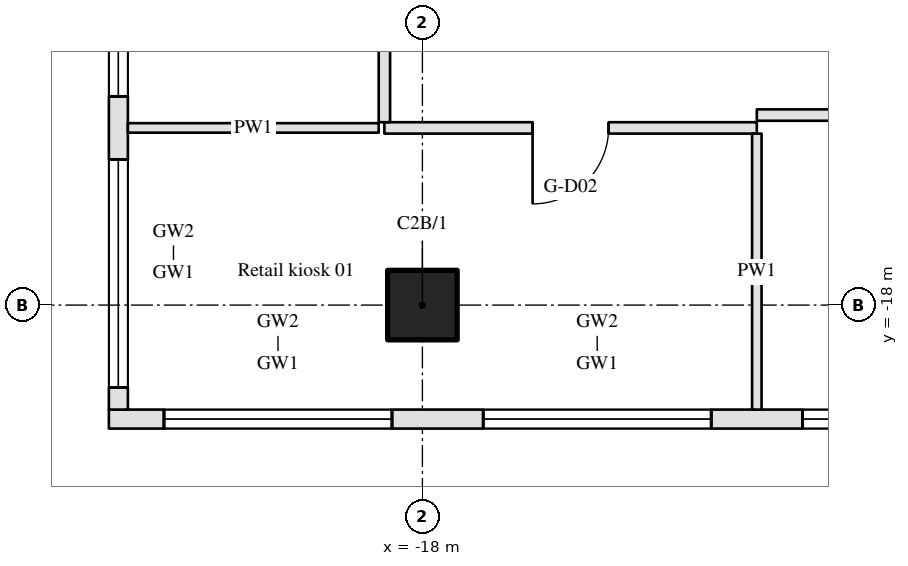
"""IFC4 building model, lengths in metres.
Left out: names, types, materials, properties, quantities, classifications, styles, units other than length and angle.
Written with IfcOpenShell. Run it as: python <this file> out.ifc"""

import sys

from ifc_helpers import new_model, si_unit, direction, frame, frame_2d, origin, origin_2d, place, context, subcontext, project, spatial, rectangle, hollow_circle, extrude, element, fill, save


model = new_model("IFC4")
c1 = context("Model", 3, precision=1e-05, world=origin(), true_north=direction((0.0, 1.0)))
c2 = subcontext(c1, "Body", "Model", "MODEL_VIEW")
j1 = project(units=[si_unit("LENGTHUNIT", "METRE"), si_unit("PLANEANGLEUNIT", "RADIAN")], contexts=[c1])
p1 = place(None, origin())
s1 = spatial("IfcSite", under=j1, at=p1, CompositionType="ELEMENT")
p2 = place(p1, origin())
s2 = spatial("IfcBuilding", under=s1, at=p2, CompositionType="ELEMENT")
p3 = place(p2, origin())
s3 = spatial("IfcBuildingStorey", under=s2, at=p3, CompositionType="ELEMENT", Elevation=0.0)
p4 = place(p3, frame((-18.0, -18.0, 0.0), z_axis=(0.0, 0.0, 1.0), x_axis=(1.0, 0.0, 0.0)))
e1 = element("IfcColumn", 1, at=p4, inside=s3, PredefinedType="COLUMN", context=c2, shape_type="SweptSolid", body=[
    extrude(hollow_circle(Radius=0.457, WallThickness=0.05, at=origin_2d()), origin(), (0.0, 0.0, 1.0), 10.8),
])
p5 = place(p3, frame((-22.125, -19.5, 0.0), z_axis=(0.0, 0.0, 1.0), x_axis=(1.0, 0.0, 0.0)))
e2 = element("IfcWall", 2, at=p5, inside=s3, PredefinedType="STANDARD", context=c2, shape_type="SweptSolid", body=[
    extrude(rectangle(XDim=42.25, YDim=0.25, at=frame_2d((21.125, 0.0))), origin(), (0.0, 0.0, 1.0), 10.0),
])
p6 = place(p5, frame((0.725, 0.0, 0.15)))
e3 = element("IfcOpeningElement", 3, at=p6, cuts=e2, PredefinedType="OPENING", context=c2, shape_type="SweptSolid", body=[
    extrude(rectangle(XDim=3.0, YDim=4.2, at=frame_2d((1.5, 2.1))), frame((0.0, 0.135, 0.0), z_axis=(0.0, -1.0, 0.0), x_axis=(1.0, 0.0, 0.0)), (0.0, 0.0, 1.0), 0.27),
])
p7 = place(p5, frame((0.725, 0.0, 4.95)))
e4 = element("IfcOpeningElement", 4, at=p7, cuts=e2, PredefinedType="OPENING", context=c2, shape_type="SweptSolid", body=[
    extrude(rectangle(XDim=3.0, YDim=4.4, at=frame_2d((1.5, 2.2))), frame((0.0, 0.135, 0.0), z_axis=(0.0, -1.0, 0.0), x_axis=(1.0, 0.0, 0.0)), (0.0, 0.0, 1.0), 0.27),
])
p8 = place(p5, frame((4.925, 0.0, 0.15)))
e5 = element("IfcOpeningElement", 5, at=p8, cuts=e2, PredefinedType="OPENING", context=c2, shape_type="SweptSolid", body=[
    extrude(rectangle(XDim=3.0, YDim=4.2, at=frame_2d((1.5, 2.1))), frame((0.0, 0.135, 0.0), z_axis=(0.0, -1.0, 0.0), x_axis=(1.0, 0.0, 0.0)), (0.0, 0.0, 1.0), 0.27),
])
p9 = place(p5, frame((4.925, 0.0, 4.95)))
e6 = element("IfcOpeningElement", 6, at=p9, cuts=e2, PredefinedType="OPENING", context=c2, shape_type="SweptSolid", body=[
    extrude(rectangle(XDim=3.0, YDim=4.4, at=frame_2d((1.5, 2.2))), frame((0.0, 0.135, 0.0), z_axis=(0.0, -1.0, 0.0), x_axis=(1.0, 0.0, 0.0)), (0.0, 0.0, 1.0), 0.27),
])
p10 = place(p5, frame((9.125, 0.0, 0.15)))
e7 = element("IfcOpeningElement", 7, at=p10, cuts=e2, PredefinedType="OPENING", context=c2, shape_type="SweptSolid", body=[
    extrude(rectangle(XDim=3.0, YDim=4.2, at=frame_2d((1.5, 2.1))), frame((0.0, 0.135, 0.0), z_axis=(0.0, -1.0, 0.0), x_axis=(1.0, 0.0, 0.0)), (0.0, 0.0, 1.0), 0.27),
])
p11 = place(p5, frame((9.125, 0.0, 4.95)))
e8 = element("IfcOpeningElement", 8, at=p11, cuts=e2, PredefinedType="OPENING", context=c2, shape_type="SweptSolid", body=[
    extrude(rectangle(XDim=3.0, YDim=4.4, at=frame_2d((1.5, 2.2))), frame((0.0, 0.135, 0.0), z_axis=(0.0, -1.0, 0.0), x_axis=(1.0, 0.0, 0.0)), (0.0, 0.0, 1.0), 0.27),
])
p12 = place(p5, frame((13.325, 0.0, 0.15)))
e9 = element("IfcOpeningElement", 9, at=p12, cuts=e2, PredefinedType="OPENING", context=c2, shape_type="SweptSolid", body=[
    extrude(rectangle(XDim=3.0, YDim=4.2, at=frame_2d((1.5, 2.1))), frame((0.0, 0.135, 0.0), z_axis=(0.0, -1.0, 0.0), x_axis=(1.0, 0.0, 0.0)), (0.0, 0.0, 1.0), 0.27),
])
p13 = place(p5, frame((13.325, 0.0, 4.95)))
e10 = element("IfcOpeningElement", 10, at=p13, cuts=e2, PredefinedType="OPENING", context=c2, shape_type="SweptSolid", body=[
    extrude(rectangle(XDim=3.0, YDim=4.4, at=frame_2d((1.5, 2.2))), frame((0.0, 0.135, 0.0), z_axis=(0.0, -1.0, 0.0), x_axis=(1.0, 0.0, 0.0)), (0.0, 0.0, 1.0), 0.27),
])
p14 = place(p5, frame((17.825, 0.0, 0.0)))
e11 = element("IfcOpeningElement", 11, at=p14, cuts=e2, PredefinedType="OPENING", context=c2, shape_type="SweptSolid", body=[
    extrude(rectangle(XDim=2.4, YDim=2.6, at=frame_2d((1.2, 1.3))), frame((0.0, 0.135, 0.0), z_axis=(0.0, -1.0, 0.0), x_axis=(1.0, 0.0, 0.0)), (0.0, 0.0, 1.0), 0.27),
])
p15 = place(p5, frame((17.525, 0.0, 2.9)))
e12 = element("IfcOpeningElement", 12, at=p15, cuts=e2, PredefinedType="OPENING", context=c2, shape_type="SweptSolid", body=[
    extrude(rectangle(XDim=3.0, YDim=1.45, at=frame_2d((1.5, 0.725))), frame((0.0, 0.135, 0.0), z_axis=(0.0, -1.0, 0.0), x_axis=(1.0, 0.0, 0.0)), (0.0, 0.0, 1.0), 0.27),
])
p16 = place(p5, frame((17.525, 0.0, 4.95)))
e13 = element("IfcOpeningElement", 13, at=p16, cuts=e2, PredefinedType="OPENING", context=c2, shape_type="SweptSolid", body=[
    extrude(rectangle(XDim=3.0, YDim=4.4, at=frame_2d((1.5, 2.2))), frame((0.0, 0.135, 0.0), z_axis=(0.0, -1.0, 0.0), x_axis=(1.0, 0.0, 0.0)), (0.0, 0.0, 1.0), 0.27),
])
p17 = place(p5, frame((21.725, 0.0, 0.15)))
e14 = element("IfcOpeningElement", 14, at=p17, cuts=e2, PredefinedType="OPENING", context=c2, shape_type="SweptSolid", body=[
    extrude(rectangle(XDim=3.0, YDim=4.2, at=frame_2d((1.5, 2.1))), frame((0.0, 0.135, 0.0), z_axis=(0.0, -1.0, 0.0), x_axis=(1.0, 0.0, 0.0)), (0.0, 0.0, 1.0), 0.27),
])
p18 = place(p5, frame((21.725, 0.0, 4.95)))
e15 = element("IfcOpeningElement", 15, at=p18, cuts=e2, PredefinedType="OPENING", context=c2, shape_type="SweptSolid", body=[
    extrude(rectangle(XDim=3.0, YDim=4.4, at=frame_2d((1.5, 2.2))), frame((0.0, 0.135, 0.0), z_axis=(0.0, -1.0, 0.0), x_axis=(1.0, 0.0, 0.0)), (0.0, 0.0, 1.0), 0.27),
])
p19 = place(p5, frame((26.225, 0.0, 0.0)))
e16 = element("IfcOpeningElement", 16, at=p19, cuts=e2, PredefinedType="OPENING", context=c2, shape_type="SweptSolid", body=[
    extrude(rectangle(XDim=2.4, YDim=2.6, at=frame_2d((1.2, 1.3))), frame((0.0, 0.135, 0.0), z_axis=(0.0, -1.0, 0.0), x_axis=(1.0, 0.0, 0.0)), (0.0, 0.0, 1.0), 0.27),
])
p20 = place(p5, frame((25.925, 0.0, 2.9)))
e17 = element("IfcOpeningElement", 17, at=p20, cuts=e2, PredefinedType="OPENING", context=c2, shape_type="SweptSolid", body=[
    extrude(rectangle(XDim=3.0, YDim=1.45, at=frame_2d((1.5, 0.725))), frame((0.0, 0.135, 0.0), z_axis=(0.0, -1.0, 0.0), x_axis=(1.0, 0.0, 0.0)), (0.0, 0.0, 1.0), 0.27),
])
p21 = place(p5, frame((25.925, 0.0, 4.95)))
e18 = element("IfcOpeningElement", 18, at=p21, cuts=e2, PredefinedType="OPENING", context=c2, shape_type="SweptSolid", body=[
    extrude(rectangle(XDim=3.0, YDim=4.4, at=frame_2d((1.5, 2.2))), frame((0.0, 0.135, 0.0), z_axis=(0.0, -1.0, 0.0), x_axis=(1.0, 0.0, 0.0)), (0.0, 0.0, 1.0), 0.27),
])
p22 = place(p5, frame((30.125, 0.0, 0.15)))
e19 = element("IfcOpeningElement", 19, at=p22, cuts=e2, PredefinedType="OPENING", context=c2, shape_type="SweptSolid", body=[
    extrude(rectangle(XDim=3.0, YDim=4.2, at=frame_2d((1.5, 2.1))), frame((0.0, 0.135, 0.0), z_axis=(0.0, -1.0, 0.0), x_axis=(1.0, 0.0, 0.0)), (0.0, 0.0, 1.0), 0.27),
])
p23 = place(p5, frame((30.125, 0.0, 4.95)))
e20 = element("IfcOpeningElement", 20, at=p23, cuts=e2, PredefinedType="OPENING", context=c2, shape_type="SweptSolid", body=[
    extrude(rectangle(XDim=3.0, YDim=4.4, at=frame_2d((1.5, 2.2))), frame((0.0, 0.135, 0.0), z_axis=(0.0, -1.0, 0.0), x_axis=(1.0, 0.0, 0.0)), (0.0, 0.0, 1.0), 0.27),
])
p24 = place(p5, frame((34.325, 0.0, 0.15)))
e21 = element("IfcOpeningElement", 21, at=p24, cuts=e2, PredefinedType="OPENING", context=c2, shape_type="SweptSolid", body=[
    extrude(rectangle(XDim=3.0, YDim=4.2, at=frame_2d((1.5, 2.1))), frame((0.0, 0.135, 0.0), z_axis=(0.0, -1.0, 0.0), x_axis=(1.0, 0.0, 0.0)), (0.0, 0.0, 1.0), 0.27),
])
p25 = place(p5, frame((34.325, 0.0, 4.95)))
e22 = element("IfcOpeningElement", 22, at=p25, cuts=e2, PredefinedType="OPENING", context=c2, shape_type="SweptSolid", body=[
    extrude(rectangle(XDim=3.0, YDim=4.4, at=frame_2d((1.5, 2.2))), frame((0.0, 0.135, 0.0), z_axis=(0.0, -1.0, 0.0), x_axis=(1.0, 0.0, 0.0)), (0.0, 0.0, 1.0), 0.27),
])
p26 = place(p5, frame((38.525, 0.0, 0.15)))
e23 = element("IfcOpeningElement", 23, at=p26, cuts=e2, PredefinedType="OPENING", context=c2, shape_type="SweptSolid", body=[
    extrude(rectangle(XDim=3.0, YDim=4.2, at=frame_2d((1.5, 2.1))), frame((0.0, 0.135, 0.0), z_axis=(0.0, -1.0, 0.0), x_axis=(1.0, 0.0, 0.0)), (0.0, 0.0, 1.0), 0.27),
])
p27 = place(p5, frame((38.525, 0.0, 4.95)))
e24 = element("IfcOpeningElement", 24, at=p27, cuts=e2, PredefinedType="OPENING", context=c2, shape_type="SweptSolid", body=[
    extrude(rectangle(XDim=3.0, YDim=4.4, at=frame_2d((1.5, 2.2))), frame((0.0, 0.135, 0.0), z_axis=(0.0, -1.0, 0.0), x_axis=(1.0, 0.0, 0.0)), (0.0, 0.0, 1.0), 0.27),
])
p28 = place(p3, frame((-22.0, 11.025, 0.0), z_axis=(0.0, 0.0, 1.0), x_axis=(0.0, -1.0, 0.0)))
e25 = element("IfcWall", 25, at=p28, inside=s3, PredefinedType="STANDARD", context=c2, shape_type="SweptSolid", body=[
    extrude(rectangle(XDim=30.4, YDim=0.25, at=frame_2d((15.2, 0.0))), origin(), (0.0, 0.0, 1.0), 10.0),
])
p29 = place(p28, frame((0.291, 0.0, 0.15)))
e26 = element("IfcOpeningElement", 26, at=p29, cuts=e25, PredefinedType="OPENING", context=c2, shape_type="SweptSolid", body=[
    extrude(rectangle(XDim=3.0, YDim=4.2, at=frame_2d((1.5, 2.1))), frame((0.0, 0.135, 0.0), z_axis=(0.0, -1.0, 0.0), x_axis=(1.0, 0.0, 0.0)), (0.0, 0.0, 1.0), 0.27),
])
p30 = place(p28, frame((0.291, 0.0, 4.95)))
e27 = element("IfcOpeningElement", 27, at=p30, cuts=e25, PredefinedType="OPENING", context=c2, shape_type="SweptSolid", body=[
    extrude(rectangle(XDim=3.0, YDim=4.4, at=frame_2d((1.5, 2.2))), frame((0.0, 0.135, 0.0), z_axis=(0.0, -1.0, 0.0), x_axis=(1.0, 0.0, 0.0)), (0.0, 0.0, 1.0), 0.27),
])
p31 = place(p28, frame((4.122, 0.0, 0.15)))
e28 = element("IfcOpeningElement", 28, at=p31, cuts=e25, PredefinedType="OPENING", context=c2, shape_type="SweptSolid", body=[
    extrude(rectangle(XDim=3.0, YDim=4.2, at=frame_2d((1.5, 2.1))), frame((0.0, 0.135, 0.0), z_axis=(0.0, -1.0, 0.0), x_axis=(1.0, 0.0, 0.0)), (0.0, 0.0, 1.0), 0.27),
])
p32 = place(p28, frame((4.122, 0.0, 4.95)))
e29 = element("IfcOpeningElement", 29, at=p32, cuts=e25, PredefinedType="OPENING", context=c2, shape_type="SweptSolid", body=[
    extrude(rectangle(XDim=3.0, YDim=4.4, at=frame_2d((1.5, 2.2))), frame((0.0, 0.135, 0.0), z_axis=(0.0, -1.0, 0.0), x_axis=(1.0, 0.0, 0.0)), (0.0, 0.0, 1.0), 0.27),
])
p33 = place(p28, frame((7.953, 0.0, 0.15)))
e30 = element("IfcOpeningElement", 30, at=p33, cuts=e25, PredefinedType="OPENING", context=c2, shape_type="SweptSolid", body=[
    extrude(rectangle(XDim=3.0, YDim=4.2, at=frame_2d((1.5, 2.1))), frame((0.0, 0.135, 0.0), z_axis=(0.0, -1.0, 0.0), x_axis=(1.0, 0.0, 0.0)), (0.0, 0.0, 1.0), 0.27),
])
p34 = place(p28, frame((7.953, 0.0, 4.95)))
e31 = element("IfcOpeningElement", 31, at=p34, cuts=e25, PredefinedType="OPENING", context=c2, shape_type="SweptSolid", body=[
    extrude(rectangle(XDim=3.0, YDim=4.4, at=frame_2d((1.5, 2.2))), frame((0.0, 0.135, 0.0), z_axis=(0.0, -1.0, 0.0), x_axis=(1.0, 0.0, 0.0)), (0.0, 0.0, 1.0), 0.27),
])
p35 = place(p28, frame((11.784, 0.0, 0.15)))
e32 = element("IfcOpeningElement", 32, at=p35, cuts=e25, PredefinedType="OPENING", context=c2, shape_type="SweptSolid", body=[
    extrude(rectangle(XDim=3.0, YDim=4.2, at=frame_2d((1.5, 2.1))), frame((0.0, 0.135, 0.0), z_axis=(0.0, -1.0, 0.0), x_axis=(1.0, 0.0, 0.0)), (0.0, 0.0, 1.0), 0.27),
])
p36 = place(p28, frame((11.784, 0.0, 4.95)))
e33 = element("IfcOpeningElement", 33, at=p36, cuts=e25, PredefinedType="OPENING", context=c2, shape_type="SweptSolid", body=[
    extrude(rectangle(XDim=3.0, YDim=4.4, at=frame_2d((1.5, 2.2))), frame((0.0, 0.135, 0.0), z_axis=(0.0, -1.0, 0.0), x_axis=(1.0, 0.0, 0.0)), (0.0, 0.0, 1.0), 0.27),
])
p37 = place(p28, frame((15.916, 0.0, 0.0)))
e34 = element("IfcOpeningElement", 34, at=p37, cuts=e25, PredefinedType="OPENING", context=c2, shape_type="SweptSolid", body=[
    extrude(rectangle(XDim=2.4, YDim=2.6, at=frame_2d((1.2, 1.3))), frame((0.0, 0.135, 0.0), z_axis=(0.0, -1.0, 0.0), x_axis=(1.0, 0.0, 0.0)), (0.0, 0.0, 1.0), 0.27),
])
p38 = place(p28, frame((15.616, 0.0, 2.9)))
e35 = element("IfcOpeningElement", 35, at=p38, cuts=e25, PredefinedType="OPENING", context=c2, shape_type="SweptSolid", body=[
    extrude(rectangle(XDim=3.0, YDim=1.45, at=frame_2d((1.5, 0.725))), frame((0.0, 0.135, 0.0), z_axis=(0.0, -1.0, 0.0), x_axis=(1.0, 0.0, 0.0)), (0.0, 0.0, 1.0), 0.27),
])
p39 = place(p28, frame((15.616, 0.0, 4.95)))
e36 = element("IfcOpeningElement", 36, at=p39, cuts=e25, PredefinedType="OPENING", context=c2, shape_type="SweptSolid", body=[
    extrude(rectangle(XDim=3.0, YDim=4.4, at=frame_2d((1.5, 2.2))), frame((0.0, 0.135, 0.0), z_axis=(0.0, -1.0, 0.0), x_axis=(1.0, 0.0, 0.0)), (0.0, 0.0, 1.0), 0.27),
])
p40 = place(p28, frame((19.447, 0.0, 0.15)))
e37 = element("IfcOpeningElement", 37, at=p40, cuts=e25, PredefinedType="OPENING", context=c2, shape_type="SweptSolid", body=[
    extrude(rectangle(XDim=3.0, YDim=4.2, at=frame_2d((1.5, 2.1))), frame((0.0, 0.135, 0.0), z_axis=(0.0, -1.0, 0.0), x_axis=(1.0, 0.0, 0.0)), (0.0, 0.0, 1.0), 0.27),
])
p41 = place(p28, frame((19.447, 0.0, 4.95)))
e38 = element("IfcOpeningElement", 38, at=p41, cuts=e25, PredefinedType="OPENING", context=c2, shape_type="SweptSolid", body=[
    extrude(rectangle(XDim=3.0, YDim=4.4, at=frame_2d((1.5, 2.2))), frame((0.0, 0.135, 0.0), z_axis=(0.0, -1.0, 0.0), x_axis=(1.0, 0.0, 0.0)), (0.0, 0.0, 1.0), 0.27),
])
p42 = place(p28, frame((23.278, 0.0, 0.15)))
e39 = element("IfcOpeningElement", 39, at=p42, cuts=e25, PredefinedType="OPENING", context=c2, shape_type="SweptSolid", body=[
    extrude(rectangle(XDim=3.0, YDim=4.2, at=frame_2d((1.5, 2.1))), frame((0.0, 0.135, 0.0), z_axis=(0.0, -1.0, 0.0), x_axis=(1.0, 0.0, 0.0)), (0.0, 0.0, 1.0), 0.27),
])
p43 = place(p28, frame((23.278, 0.0, 4.95)))
e40 = element("IfcOpeningElement", 40, at=p43, cuts=e25, PredefinedType="OPENING", context=c2, shape_type="SweptSolid", body=[
    extrude(rectangle(XDim=3.0, YDim=4.4, at=frame_2d((1.5, 2.2))), frame((0.0, 0.135, 0.0), z_axis=(0.0, -1.0, 0.0), x_axis=(1.0, 0.0, 0.0)), (0.0, 0.0, 1.0), 0.27),
])
p44 = place(p28, frame((27.109, 0.0, 0.15)))
e41 = element("IfcOpeningElement", 41, at=p44, cuts=e25, PredefinedType="OPENING", context=c2, shape_type="SweptSolid", body=[
    extrude(rectangle(XDim=3.0, YDim=4.2, at=frame_2d((1.5, 2.1))), frame((0.0, 0.135, 0.0), z_axis=(0.0, -1.0, 0.0), x_axis=(1.0, 0.0, 0.0)), (0.0, 0.0, 1.0), 0.27),
])
p45 = place(p28, frame((27.109, 0.0, 4.95)))
e42 = element("IfcOpeningElement", 42, at=p45, cuts=e25, PredefinedType="OPENING", context=c2, shape_type="SweptSolid", body=[
    extrude(rectangle(XDim=3.0, YDim=4.4, at=frame_2d((1.5, 2.2))), frame((0.0, 0.135, 0.0), z_axis=(0.0, -1.0, 0.0), x_axis=(1.0, 0.0, 0.0)), (0.0, 0.0, 1.0), 0.27),
])
p46 = place(p3, frame((-21.875, -15.669, 0.0), z_axis=(0.0, 0.0, 1.0), x_axis=(1.0, 0.0, 0.0)))
e43 = element("IfcWall", 43, at=p46, inside=s3, PredefinedType="PARTITIONING", context=c2, shape_type="SweptSolid", body=[
    extrude(rectangle(XDim=3.3, YDim=0.125, at=frame_2d((1.65, 0.0))), origin(), (0.0, 0.0, 1.0), 9.86),
])
p47 = place(p3, frame((-13.6, -15.669, 0.0), z_axis=(0.0, 0.0, 1.0), x_axis=(-1.0, 0.0, 0.0)))
e44 = element("IfcWall", 44, at=p47, inside=s3, PredefinedType="PARTITIONING", context=c2, shape_type="SweptSolid", body=[
    extrude(rectangle(XDim=4.9, YDim=0.15, at=frame_2d((2.45, 0.0))), origin(), (0.0, 0.0, 1.0), 9.86),
])
p48 = place(p47, frame((1.95, 0.0, 0.0)))
e45 = element("IfcOpeningElement", 45, at=p48, cuts=e44, PredefinedType="OPENING", context=c2, shape_type="SweptSolid", body=[
    extrude(rectangle(XDim=1.0, YDim=2.1, at=frame_2d((0.5, 1.05))), frame((0.0, 0.085, 0.0), z_axis=(0.0, -1.0, 0.0), x_axis=(1.0, 0.0, 0.0)), (0.0, 0.0, 1.0), 0.17),
])
p49 = place(p3, frame((-5.2, -15.5, 0.0), z_axis=(0.0, 0.0, 1.0), x_axis=(-1.0, 0.0, 0.0)))
e46 = element("IfcWall", 46, at=p49, inside=s3, PredefinedType="PARTITIONING", context=c2, shape_type="SweptSolid", body=[
    extrude(rectangle(XDim=8.4, YDim=0.15, at=frame_2d((4.2, 0.0))), origin(), (0.0, 0.0, 1.0), 9.86),
])
p50 = place(p49, frame((3.7, 0.0, 0.0)))
e47 = element("IfcOpeningElement", 47, at=p50, cuts=e46, PredefinedType="OPENING", context=c2, shape_type="SweptSolid", body=[
    extrude(rectangle(XDim=1.0, YDim=2.1, at=frame_2d((0.5, 1.05))), frame((0.0, 0.085, 0.0), z_axis=(0.0, -1.0, 0.0), x_axis=(1.0, 0.0, 0.0)), (0.0, 0.0, 1.0), 0.17),
])
p51 = place(p3, frame((-18.5, -15.594, 0.0), z_axis=(0.0, 0.0, 1.0), x_axis=(0.0, 1.0, 0.0)))
e48 = element("IfcWall", 48, at=p51, inside=s3, PredefinedType="PARTITIONING", context=c2, shape_type="SweptSolid", body=[
    extrude(rectangle(XDim=6.094, YDim=0.15, at=frame_2d((3.047, 0.0))), origin(), (0.0, 0.0, 1.0), 9.86),
])
p52 = place(p51, frame((2.547, 0.0, 0.0)))
e49 = element("IfcOpeningElement", 49, at=p52, cuts=e48, PredefinedType="OPENING", context=c2, shape_type="SweptSolid", body=[
    extrude(rectangle(XDim=1.0, YDim=2.1, at=frame_2d((0.5, 1.05))), frame((0.0, 0.085, 0.0), z_axis=(0.0, -1.0, 0.0), x_axis=(1.0, 0.0, 0.0)), (0.0, 0.0, 1.0), 0.17),
])
p53 = place(p3, frame((-13.6, -19.375, 0.0), z_axis=(0.0, 0.0, 1.0), x_axis=(0.0, 1.0, 0.0)))
e50 = element("IfcWall", 50, at=p53, inside=s3, PredefinedType="PARTITIONING", context=c2, shape_type="SweptSolid", body=[
    extrude(rectangle(XDim=3.631, YDim=0.125, at=frame_2d((1.815, 0.0))), origin(), (0.0, 0.0, 1.0), 9.86),
])
p54 = place(p6, origin())
e51 = element("IfcWindow", 51, at=p54, inside=s3, PartitioningType="DOUBLE_PANEL_HORIZONTAL", PredefinedType="WINDOW", context=c2, shape_type="SweptSolid", body=[
    extrude(rectangle(XDim=3.0, YDim=4.2, at=frame_2d((1.5, 2.1))), frame((0.0, 0.03, 0.0), z_axis=(0.0, -1.0, 0.0), x_axis=(1.0, 0.0, 0.0)), (0.0, 0.0, 1.0), 0.06),
])
fill(e3, e51)
p55 = place(p7, origin())
e52 = element("IfcWindow", 52, at=p55, inside=s3, PartitioningType="DOUBLE_PANEL_HORIZONTAL", PredefinedType="WINDOW", context=c2, shape_type="SweptSolid", body=[
    extrude(rectangle(XDim=3.0, YDim=4.4, at=frame_2d((1.5, 2.2))), frame((0.0, 0.03, 0.0), z_axis=(0.0, -1.0, 0.0), x_axis=(1.0, 0.0, 0.0)), (0.0, 0.0, 1.0), 0.06),
])
fill(e4, e52)
p56 = place(p8, origin())
e53 = element("IfcWindow", 53, at=p56, inside=s3, PartitioningType="DOUBLE_PANEL_HORIZONTAL", PredefinedType="WINDOW", context=c2, shape_type="SweptSolid", body=[
    extrude(rectangle(XDim=3.0, YDim=4.2, at=frame_2d((1.5, 2.1))), frame((0.0, 0.03, 0.0), z_axis=(0.0, -1.0, 0.0), x_axis=(1.0, 0.0, 0.0)), (0.0, 0.0, 1.0), 0.06),
])
fill(e5, e53)
p57 = place(p9, origin())
e54 = element("IfcWindow", 54, at=p57, inside=s3, PartitioningType="DOUBLE_PANEL_HORIZONTAL", PredefinedType="WINDOW", context=c2, shape_type="SweptSolid", body=[
    extrude(rectangle(XDim=3.0, YDim=4.4, at=frame_2d((1.5, 2.2))), frame((0.0, 0.03, 0.0), z_axis=(0.0, -1.0, 0.0), x_axis=(1.0, 0.0, 0.0)), (0.0, 0.0, 1.0), 0.06),
])
fill(e6, e54)
p58 = place(p10, origin())
e55 = element("IfcWindow", 55, at=p58, inside=s3, PartitioningType="DOUBLE_PANEL_HORIZONTAL", PredefinedType="WINDOW", context=c2, shape_type="SweptSolid", body=[
    extrude(rectangle(XDim=3.0, YDim=4.2, at=frame_2d((1.5, 2.1))), frame((0.0, 0.03, 0.0), z_axis=(0.0, -1.0, 0.0), x_axis=(1.0, 0.0, 0.0)), (0.0, 0.0, 1.0), 0.06),
])
fill(e7, e55)
p59 = place(p11, origin())
e56 = element("IfcWindow", 56, at=p59, inside=s3, PartitioningType="DOUBLE_PANEL_HORIZONTAL", PredefinedType="WINDOW", context=c2, shape_type="SweptSolid", body=[
    extrude(rectangle(XDim=3.0, YDim=4.4, at=frame_2d((1.5, 2.2))), frame((0.0, 0.03, 0.0), z_axis=(0.0, -1.0, 0.0), x_axis=(1.0, 0.0, 0.0)), (0.0, 0.0, 1.0), 0.06),
])
fill(e8, e56)
p60 = place(p42, origin())
e57 = element("IfcWindow", 57, at=p60, inside=s3, PartitioningType="DOUBLE_PANEL_HORIZONTAL", PredefinedType="WINDOW", context=c2, shape_type="SweptSolid", body=[
    extrude(rectangle(XDim=3.0, YDim=4.2, at=frame_2d((1.5, 2.1))), frame((0.0, 0.03, 0.0), z_axis=(0.0, -1.0, 0.0), x_axis=(1.0, 0.0, 0.0)), (0.0, 0.0, 1.0), 0.06),
])
fill(e39, e57)
p61 = place(p43, origin())
e58 = element("IfcWindow", 58, at=p61, inside=s3, PartitioningType="DOUBLE_PANEL_HORIZONTAL", PredefinedType="WINDOW", context=c2, shape_type="SweptSolid", body=[
    extrude(rectangle(XDim=3.0, YDim=4.4, at=frame_2d((1.5, 2.2))), frame((0.0, 0.03, 0.0), z_axis=(0.0, -1.0, 0.0), x_axis=(1.0, 0.0, 0.0)), (0.0, 0.0, 1.0), 0.06),
])
fill(e40, e58)
p62 = place(p44, origin())
e59 = element("IfcWindow", 59, at=p62, inside=s3, PartitioningType="DOUBLE_PANEL_HORIZONTAL", PredefinedType="WINDOW", context=c2, shape_type="SweptSolid", body=[
    extrude(rectangle(XDim=3.0, YDim=4.2, at=frame_2d((1.5, 2.1))), frame((0.0, 0.03, 0.0), z_axis=(0.0, -1.0, 0.0), x_axis=(1.0, 0.0, 0.0)), (0.0, 0.0, 1.0), 0.06),
])
fill(e41, e59)
p63 = place(p45, origin())
e60 = element("IfcWindow", 60, at=p63, inside=s3, PartitioningType="DOUBLE_PANEL_HORIZONTAL", PredefinedType="WINDOW", context=c2, shape_type="SweptSolid", body=[
    extrude(rectangle(XDim=3.0, YDim=4.4, at=frame_2d((1.5, 2.2))), frame((0.0, 0.03, 0.0), z_axis=(0.0, -1.0, 0.0), x_axis=(1.0, 0.0, 0.0)), (0.0, 0.0, 1.0), 0.06),
])
fill(e42, e60)
p64 = place(p48, origin())
e61 = element("IfcDoor", 61, at=p64, inside=s3, OperationType="SINGLE_SWING_RIGHT", PredefinedType="DOOR", context=c2, shape_type="SweptSolid", body=[
    extrude(rectangle(XDim=1.0, YDim=2.1, at=frame_2d((0.5, 1.05))), frame((0.0, 0.025, 0.0), z_axis=(0.0, -1.0, 0.0), x_axis=(1.0, 0.0, 0.0)), (0.0, 0.0, 1.0), 0.05),
])
fill(e45, e61)
save(model, sys.argv[1])
